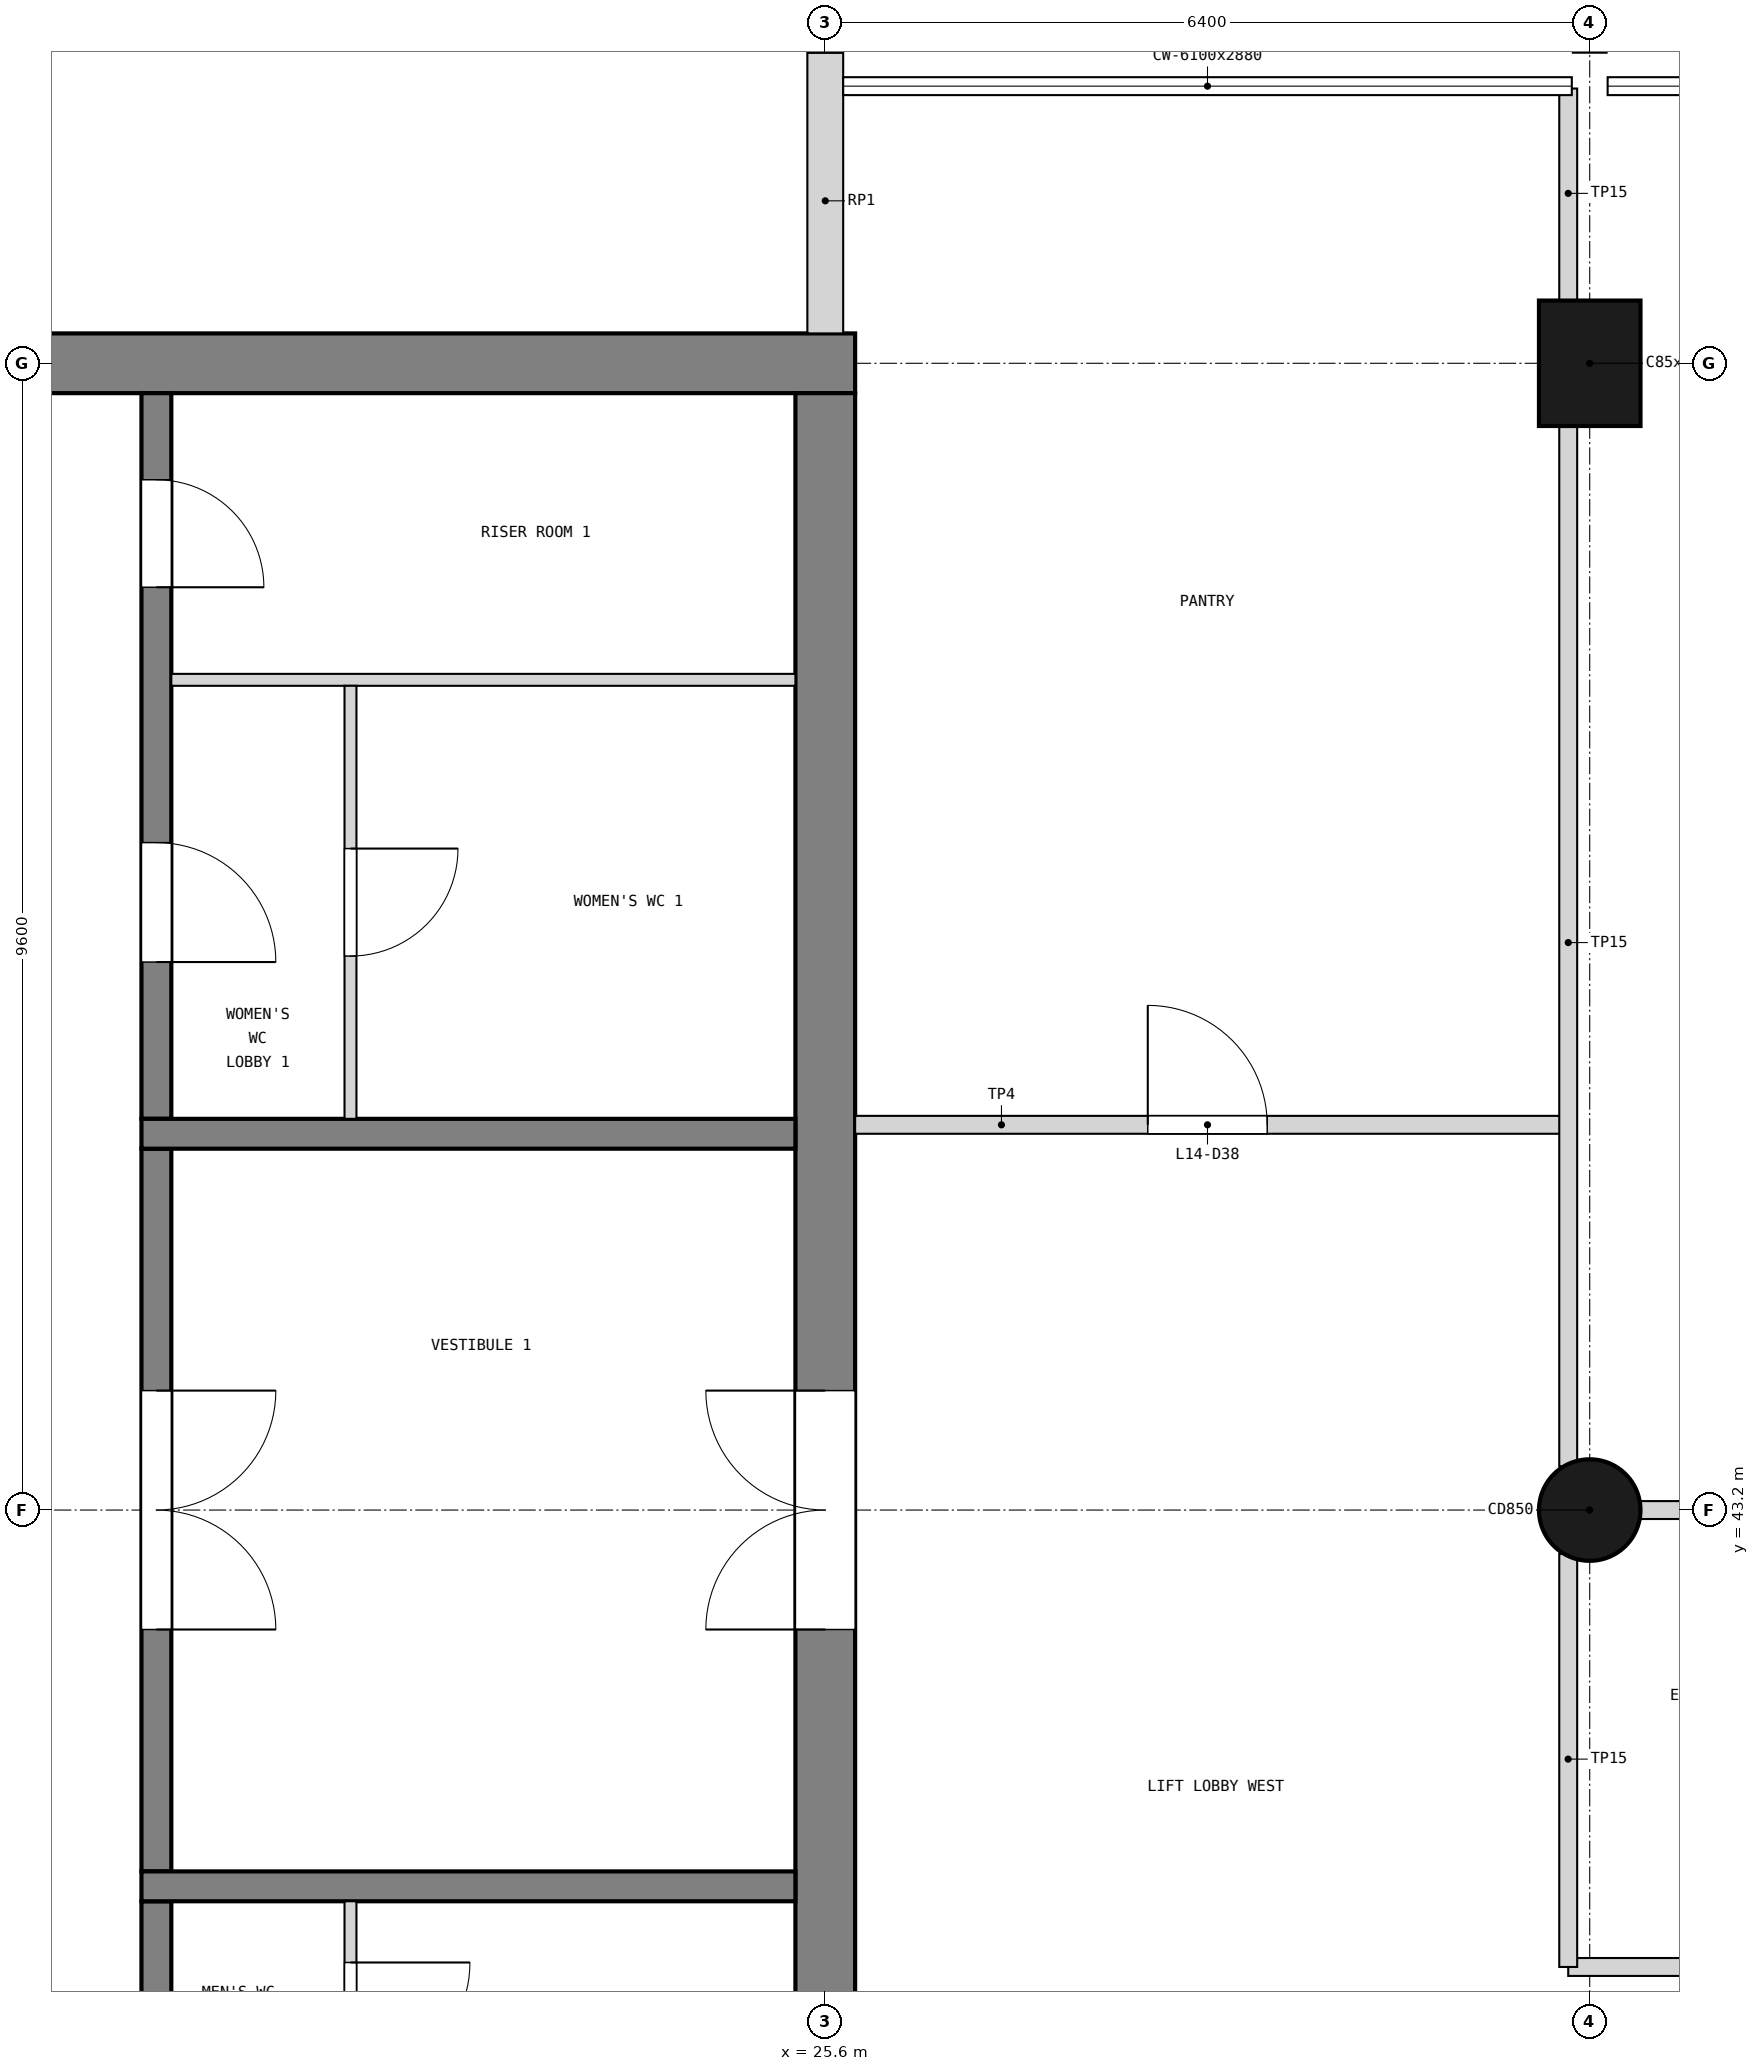
"""IFC4 building model, lengths in metres.
Left out: names, types, materials, properties, quantities, classifications, styles, units other than length and angle.
Written with IfcOpenShell. Run it as: python <this file> out.ifc"""

import sys

from ifc_helpers import new_model, si_unit, direction, frame, frame_2d, origin, origin_2d, place, context, subcontext, project, spatial, rectangle, circle, extrude, element, fill, save


model = new_model("IFC4")
c1 = context("Model", 3, precision=1e-05, world=origin(), true_north=direction((0.0, 1.0)))
c2 = subcontext(c1, "Body", "Model", "MODEL_VIEW")
j1 = project(units=[si_unit("LENGTHUNIT", "METRE"), si_unit("PLANEANGLEUNIT", "RADIAN")], contexts=[c1])
p1 = place(None, origin())
s1 = spatial("IfcSite", under=j1, at=p1, CompositionType="ELEMENT")
p2 = place(p1, origin())
s2 = spatial("IfcBuilding", under=s1, at=p2, CompositionType="ELEMENT")
p3 = place(p2, frame((0.0, 0.0, 56.1)))
s3 = spatial("IfcBuildingStorey", under=s2, at=p3, CompositionType="ELEMENT", Elevation=56.1)
p4 = place(p3, frame((12.55, 52.8, 0.0), z_axis=(0.0, 0.0, 1.0), x_axis=(1.0, 0.0, 0.0)))
e1 = element("IfcWall", 1, at=p4, inside=s3, PredefinedType="SHEAR", context=c2, shape_type="SweptSolid", body=[
    extrude(rectangle(XDim=13.3, YDim=0.5, at=frame_2d((6.65, 0.0))), origin(), (0.0, 0.0, 1.0), 3.9),
])
p5 = place(p4, frame((1.85, 0.0, 1.0)))
e2 = element("IfcOpeningElement", 2, at=p5, cuts=e1, PredefinedType="OPENING", context=c2, shape_type="SweptSolid", body=[
    extrude(rectangle(XDim=0.4, YDim=2.0, at=frame_2d((0.2, 1.0))), frame((0.0, 0.26, 0.0), z_axis=(0.0, -1.0, 0.0), x_axis=(1.0, 0.0, 0.0)), (0.0, 0.0, 1.0), 0.52),
])
p6 = place(p3, frame((25.6, 33.85, 0.0), z_axis=(0.0, 0.0, 1.0), x_axis=(0.0, 1.0, 0.0)))
e3 = element("IfcWall", 3, at=p6, inside=s3, PredefinedType="SHEAR", context=c2, shape_type="SweptSolid", body=[
    extrude(rectangle(XDim=18.7, YDim=0.5, at=frame_2d((9.35, 0.0))), origin(), (0.0, 0.0, 1.0), 3.9),
])
p7 = place(p6, frame((8.35, 0.0, 0.0)))
e4 = element("IfcOpeningElement", 4, at=p7, cuts=e3, PredefinedType="OPENING", context=c2, shape_type="SweptSolid", body=[
    extrude(rectangle(XDim=2.0, YDim=2.1, at=frame_2d((1.0, 1.05))), frame((0.0, 0.26, 0.0), z_axis=(0.0, -1.0, 0.0), x_axis=(1.0, 0.0, 0.0)), (0.0, 0.0, 1.0), 0.52),
])
p8 = place(p3, frame((32.0, 43.2, 0.0), z_axis=(0.0, 0.0, 1.0), x_axis=(1.0, 0.0, 0.0)))
e5 = element("IfcColumn", 5, at=p8, inside=s3, PredefinedType="COLUMN", context=c2, shape_type="SweptSolid", body=[
    extrude(circle(Radius=0.425, at=origin_2d()), origin(), (0.0, 0.0, 1.0), 3.9),
])
p9 = place(p3, frame((32.0, 52.8, 0.0), z_axis=(0.0, 0.0, 1.0), x_axis=(1.0, 0.0, 0.0)))
e6 = element("IfcColumn", 6, at=p9, inside=s3, PredefinedType="COLUMN", context=c2, shape_type="SweptSolid", body=[
    extrude(rectangle(XDim=0.85, YDim=1.05, at=origin_2d()), origin(), (0.0, 0.0, 1.0), 3.9),
])
p10 = place(p3, frame((25.6, 53.05, 0.0), z_axis=(0.0, 0.0, 1.0), x_axis=(0.0, 1.0, 0.0)))
e7 = element("IfcWall", 7, at=p10, inside=s3, PredefinedType="SOLIDWALL", context=c2, shape_type="SweptSolid", body=[
    extrude(rectangle(XDim=2.35, YDim=0.3, at=frame_2d((1.175, 0.0))), origin(), (0.0, 0.0, 1.0), 2.88),
])
p11 = place(p3, frame((20.0, 33.85, 0.0), z_axis=(0.0, 0.0, 1.0), x_axis=(0.0, 1.0, 0.0)))
e8 = element("IfcWall", 8, at=p11, inside=s3, PredefinedType="SOLIDWALL", context=c2, shape_type="SweptSolid", body=[
    extrude(rectangle(XDim=6.075, YDim=0.25, at=frame_2d((3.038, 0.0))), origin(), (0.0, 0.0, 1.0), 3.6),
])
p12 = place(p11, frame((0.425, 0.0, 0.0)))
e9 = element("IfcOpeningElement", 9, at=p12, cuts=e8, PredefinedType="OPENING", context=c2, shape_type="SweptSolid", body=[
    extrude(rectangle(XDim=0.8, YDim=2.1, at=frame_2d((0.4, 1.05))), frame((0.0, 0.135, 0.0), z_axis=(0.0, -1.0, 0.0), x_axis=(1.0, 0.0, 0.0)), (0.0, 0.0, 1.0), 0.27),
])
p13 = place(p11, frame((3.413, 0.0, 0.0)))
e10 = element("IfcOpeningElement", 10, at=p13, cuts=e8, PredefinedType="OPENING", context=c2, shape_type="SweptSolid", body=[
    extrude(rectangle(XDim=1.0, YDim=2.1, at=frame_2d((0.5, 1.05))), frame((0.0, 0.135, 0.0), z_axis=(0.0, -1.0, 0.0), x_axis=(1.0, 0.0, 0.0)), (0.0, 0.0, 1.0), 0.27),
])
p14 = place(p3, frame((20.0, 40.175, 0.0), z_axis=(0.0, 0.0, 1.0), x_axis=(0.0, 1.0, 0.0)))
e11 = element("IfcWall", 11, at=p14, inside=s3, PredefinedType="SOLIDWALL", context=c2, shape_type="SweptSolid", body=[
    extrude(rectangle(XDim=6.05, YDim=0.25, at=frame_2d((3.025, 0.0))), origin(), (0.0, 0.0, 1.0), 3.6),
])
p15 = place(p14, frame((2.025, 0.0, 0.0)))
e12 = element("IfcOpeningElement", 12, at=p15, cuts=e11, PredefinedType="OPENING", context=c2, shape_type="SweptSolid", body=[
    extrude(rectangle(XDim=2.0, YDim=2.1, at=frame_2d((1.0, 1.05))), frame((0.0, 0.135, 0.0), z_axis=(0.0, -1.0, 0.0), x_axis=(1.0, 0.0, 0.0)), (0.0, 0.0, 1.0), 0.27),
])
p16 = place(p3, frame((20.0, 46.475, 0.0), z_axis=(0.0, 0.0, 1.0), x_axis=(0.0, 1.0, 0.0)))
e13 = element("IfcWall", 13, at=p16, inside=s3, PredefinedType="SOLIDWALL", context=c2, shape_type="SweptSolid", body=[
    extrude(rectangle(XDim=6.075, YDim=0.25, at=frame_2d((3.038, 0.0))), origin(), (0.0, 0.0, 1.0), 3.6),
])
p17 = place(p16, frame((1.312, 0.0, 0.0)))
e14 = element("IfcOpeningElement", 14, at=p17, cuts=e13, PredefinedType="OPENING", context=c2, shape_type="SweptSolid", body=[
    extrude(rectangle(XDim=1.0, YDim=2.1, at=frame_2d((0.5, 1.05))), frame((0.0, 0.135, 0.0), z_axis=(0.0, -1.0, 0.0), x_axis=(1.0, 0.0, 0.0)), (0.0, 0.0, 1.0), 0.27),
])
p18 = place(p16, frame((4.45, 0.0, 0.0)))
e15 = element("IfcOpeningElement", 15, at=p18, cuts=e13, PredefinedType="OPENING", context=c2, shape_type="SweptSolid", body=[
    extrude(rectangle(XDim=0.9, YDim=2.1, at=frame_2d((0.45, 1.05))), frame((0.0, 0.135, 0.0), z_axis=(0.0, -1.0, 0.0), x_axis=(1.0, 0.0, 0.0)), (0.0, 0.0, 1.0), 0.27),
])
for number, where, z_axis, x_axis in (
    (16, (19.875, 40.05, 0.0), (0.0, 0.0, 1.0), (1.0, 0.0, 0.0)),
    (17, (19.875, 46.35, 0.0), (0.0, 0.0, 1.0), (1.0, 0.0, 0.0)),
):
    element("IfcWall", number, at=place(p3, frame(where, z_axis=z_axis, x_axis=x_axis)), inside=s3, PredefinedType="SOLIDWALL", context=c2, shape_type="SweptSolid", body=[
        extrude(rectangle(XDim=5.475, YDim=0.25, at=frame_2d((2.738, 0.0))), origin(), (0.0, 0.0, 1.0), 3.6),
    ])
p19 = place(p3, frame((21.625, 35.6, 0.0), z_axis=(0.0, 0.0, 1.0), x_axis=(0.0, 1.0, 0.0)))
e18 = element("IfcWall", 18, at=p19, inside=s3, PredefinedType="PARTITIONING", context=c2, shape_type="SweptSolid", body=[
    extrude(rectangle(XDim=4.325, YDim=0.1, at=frame_2d((2.163, 0.0))), origin(), (0.0, 0.0, 1.0), 3.6),
])
p20 = place(p19, frame((0.45, 0.0, 0.0)))
e19 = element("IfcOpeningElement", 19, at=p20, cuts=e18, PredefinedType="OPENING", context=c2, shape_type="SweptSolid", body=[
    extrude(rectangle(XDim=0.9, YDim=2.1, at=frame_2d((0.45, 1.05))), frame((0.0, 0.06, 0.0), z_axis=(0.0, -1.0, 0.0), x_axis=(1.0, 0.0, 0.0)), (0.0, 0.0, 1.0), 0.12),
])
p21 = place(p19, frame((2.812, 0.0, 0.0)))
e20 = element("IfcOpeningElement", 20, at=p21, cuts=e18, PredefinedType="OPENING", context=c2, shape_type="SweptSolid", body=[
    extrude(rectangle(XDim=1.0, YDim=2.1, at=frame_2d((0.5, 1.05))), frame((0.0, 0.06, 0.0), z_axis=(0.0, -1.0, 0.0), x_axis=(1.0, 0.0, 0.0)), (0.0, 0.0, 1.0), 0.12),
])
p22 = place(p3, frame((20.125, 50.15, 0.0), z_axis=(0.0, 0.0, 1.0), x_axis=(1.0, 0.0, 0.0)))
e21 = element("IfcWall", 21, at=p22, inside=s3, PredefinedType="PARTITIONING", context=c2, shape_type="SweptSolid", body=[
    extrude(rectangle(XDim=5.225, YDim=0.1, at=frame_2d((2.613, 0.0))), origin(), (0.0, 0.0, 1.0), 3.6),
])
p23 = place(p3, frame((21.625, 46.475, 0.0), z_axis=(0.0, 0.0, 1.0), x_axis=(0.0, 1.0, 0.0)))
e22 = element("IfcWall", 22, at=p23, inside=s3, PredefinedType="PARTITIONING", context=c2, shape_type="SweptSolid", body=[
    extrude(rectangle(XDim=3.625, YDim=0.1, at=frame_2d((1.812, 0.0))), origin(), (0.0, 0.0, 1.0), 3.6),
])
p24 = place(p23, frame((1.363, 0.0, 0.0)))
e23 = element("IfcOpeningElement", 23, at=p24, cuts=e22, PredefinedType="OPENING", context=c2, shape_type="SweptSolid", body=[
    extrude(rectangle(XDim=0.9, YDim=2.1, at=frame_2d((0.45, 1.05))), frame((0.0, 0.06, 0.0), z_axis=(0.0, -1.0, 0.0), x_axis=(1.0, 0.0, 0.0)), (0.0, 0.0, 1.0), 0.12),
])
p25 = place(p3, frame((31.82, 39.375, 0.0), z_axis=(0.0, 0.0, 1.0), x_axis=(1.0, 0.0, 0.0)))
e24 = element("IfcWall", 24, at=p25, inside=s3, PredefinedType="PARTITIONING", context=c2, shape_type="SweptSolid", body=[
    extrude(rectangle(XDim=6.4, YDim=0.15, at=frame_2d((3.2, 0.0))), origin(), (0.0, 0.0, 1.0), 3.68),
])
p26 = place(p25, frame((2.28, 0.0, 0.0)))
e25 = element("IfcOpeningElement", 25, at=p26, cuts=e24, PredefinedType="OPENING", context=c2, shape_type="SweptSolid", body=[
    extrude(rectangle(XDim=1.8, YDim=2.1, at=frame_2d((0.9, 1.05))), frame((0.0, 0.085, 0.0), z_axis=(0.0, -1.0, 0.0), x_axis=(1.0, 0.0, 0.0)), (0.0, 0.0, 1.0), 0.17),
])
p27 = place(p3, frame((31.82, 43.2, 0.0), z_axis=(0.0, 0.0, 1.0), x_axis=(1.0, 0.0, 0.0)))
e26 = element("IfcWall", 26, at=p27, inside=s3, PredefinedType="PARTITIONING", context=c2, shape_type="SweptSolid", body=[
    extrude(rectangle(XDim=25.96, YDim=0.15, at=frame_2d((12.98, 0.0))), origin(), (0.0, 0.0, 1.0), 2.88),
])
p28 = place(p27, frame((7.975, 0.0, 0.0)))
e27 = element("IfcOpeningElement", 27, at=p28, cuts=e26, PredefinedType="OPENING", context=c2, shape_type="SweptSolid", body=[
    extrude(rectangle(XDim=1.8, YDim=2.1, at=frame_2d((0.9, 1.05))), frame((0.0, 0.085, 0.0), z_axis=(0.0, -1.0, 0.0), x_axis=(1.0, 0.0, 0.0)), (0.0, 0.0, 1.0), 0.17),
])
p29 = place(p27, frame((13.725, 0.0, 0.0)))
e28 = element("IfcOpeningElement", 28, at=p29, cuts=e26, PredefinedType="OPENING", context=c2, shape_type="SweptSolid", body=[
    extrude(rectangle(XDim=1.8, YDim=2.1, at=frame_2d((0.9, 1.05))), frame((0.0, 0.085, 0.0), z_axis=(0.0, -1.0, 0.0), x_axis=(1.0, 0.0, 0.0)), (0.0, 0.0, 1.0), 0.17),
])
p30 = place(p27, frame((20.192, 0.0, 0.0)))
e29 = element("IfcOpeningElement", 29, at=p30, cuts=e26, PredefinedType="OPENING", context=c2, shape_type="SweptSolid", body=[
    extrude(rectangle(XDim=1.8, YDim=2.1, at=frame_2d((0.9, 1.05))), frame((0.0, 0.085, 0.0), z_axis=(0.0, -1.0, 0.0), x_axis=(1.0, 0.0, 0.0)), (0.0, 0.0, 1.0), 0.17),
])
p31 = place(p3, frame((25.85, 46.425, 0.0), z_axis=(0.0, 0.0, 1.0), x_axis=(1.0, 0.0, 0.0)))
e30 = element("IfcWall", 30, at=p31, inside=s3, PredefinedType="PARTITIONING", context=c2, shape_type="SweptSolid", body=[
    extrude(rectangle(XDim=5.97, YDim=0.15, at=frame_2d((2.985, 0.0))), origin(), (0.0, 0.0, 1.0), 3.68),
])
p32 = place(p31, frame((2.45, 0.0, 0.0)))
e31 = element("IfcOpeningElement", 31, at=p32, cuts=e30, PredefinedType="OPENING", context=c2, shape_type="SweptSolid", body=[
    extrude(rectangle(XDim=1.0, YDim=2.1, at=frame_2d((0.5, 1.05))), frame((0.0, 0.085, 0.0), z_axis=(0.0, -1.0, 0.0), x_axis=(1.0, 0.0, 0.0)), (0.0, 0.0, 1.0), 0.17),
])
p33 = place(p3, frame((31.82, 39.375, 0.0), z_axis=(0.0, 0.0, 1.0), x_axis=(0.0, 1.0, 0.0)))
e32 = element("IfcWall", 32, at=p33, inside=s3, PredefinedType="PARTITIONING", context=c2, shape_type="SweptSolid", body=[
    extrude(rectangle(XDim=3.46, YDim=0.15, at=frame_2d((1.73, 0.0))), origin(), (0.0, 0.0, 1.0), 2.78),
])
p34 = place(p3, frame((31.82, 43.565, 0.0), z_axis=(0.0, 0.0, 1.0), x_axis=(0.0, 1.0, 0.0)))
e33 = element("IfcWall", 33, at=p34, inside=s3, PredefinedType="PARTITIONING", context=c2, shape_type="SweptSolid", body=[
    extrude(rectangle(XDim=8.73, YDim=0.15, at=frame_2d((4.365, 0.0))), origin(), (0.0, 0.0, 1.0), 2.78),
])
p35 = place(p3, frame((31.82, 53.305, 0.0), z_axis=(0.0, 0.0, 1.0), x_axis=(0.0, 1.0, 0.0)))
e34 = element("IfcWall", 34, at=p35, inside=s3, PredefinedType="PARTITIONING", context=c2, shape_type="SweptSolid", body=[
    extrude(rectangle(XDim=1.795, YDim=0.15, at=frame_2d((0.897, 0.0))), origin(), (0.0, 0.0, 1.0), 2.78),
])
p36 = place(p15, frame((2.0, 0.0, 0.0), z_axis=(0.0, 0.0, 1.0), x_axis=(-1.0, 0.0, 0.0)))
e35 = element("IfcDoor", 35, at=p36, inside=s3, OperationType="DOUBLE_DOOR_SINGLE_SWING", PredefinedType="DOOR", context=c2, shape_type="SweptSolid", body=[
    extrude(rectangle(XDim=2.0, YDim=2.1, at=frame_2d((1.0, 1.05))), frame((0.0, 0.025, 0.0), z_axis=(0.0, -1.0, 0.0), x_axis=(1.0, 0.0, 0.0)), (0.0, 0.0, 1.0), 0.05),
])
fill(e12, e35)
p37 = place(p7, origin())
e36 = element("IfcDoor", 36, at=p37, inside=s3, OperationType="DOUBLE_DOOR_SINGLE_SWING", PredefinedType="DOOR", context=c2, shape_type="SweptSolid", body=[
    extrude(rectangle(XDim=2.0, YDim=2.1, at=frame_2d((1.0, 1.05))), frame((0.0, 0.025, 0.0), z_axis=(0.0, -1.0, 0.0), x_axis=(1.0, 0.0, 0.0)), (0.0, 0.0, 1.0), 0.05),
])
fill(e4, e36)
p38 = place(p21, frame((1.0, 0.0, 0.0), z_axis=(0.0, 0.0, 1.0), x_axis=(-1.0, 0.0, 0.0)))
e37 = element("IfcDoor", 37, at=p38, inside=s3, OperationType="SINGLE_SWING_LEFT", PredefinedType="DOOR", context=c2, shape_type="SweptSolid", body=[
    extrude(rectangle(XDim=1.0, YDim=2.1, at=frame_2d((0.5, 1.05))), frame((0.0, 0.025, 0.0), z_axis=(0.0, -1.0, 0.0), x_axis=(1.0, 0.0, 0.0)), (0.0, 0.0, 1.0), 0.05),
])
fill(e20, e37)
p39 = place(p17, frame((1.0, 0.0, 0.0), z_axis=(0.0, 0.0, 1.0), x_axis=(-1.0, 0.0, 0.0)))
e38 = element("IfcDoor", 38, at=p39, inside=s3, OperationType="SINGLE_SWING_RIGHT", PredefinedType="DOOR", context=c2, shape_type="SweptSolid", body=[
    extrude(rectangle(XDim=1.0, YDim=2.1, at=frame_2d((0.5, 1.05))), frame((0.0, 0.025, 0.0), z_axis=(0.0, -1.0, 0.0), x_axis=(1.0, 0.0, 0.0)), (0.0, 0.0, 1.0), 0.05),
])
fill(e14, e38)
p40 = place(p24, frame((0.9, 0.0, 0.0), z_axis=(0.0, 0.0, 1.0), x_axis=(-1.0, 0.0, 0.0)))
e39 = element("IfcDoor", 39, at=p40, inside=s3, OperationType="SINGLE_SWING_LEFT", PredefinedType="DOOR", context=c2, shape_type="SweptSolid", body=[
    extrude(rectangle(XDim=0.9, YDim=2.1, at=frame_2d((0.45, 1.05))), frame((0.0, 0.025, 0.0), z_axis=(0.0, -1.0, 0.0), x_axis=(1.0, 0.0, 0.0)), (0.0, 0.0, 1.0), 0.05),
])
fill(e23, e39)
p41 = place(p18, frame((0.9, 0.0, 0.0), z_axis=(0.0, 0.0, 1.0), x_axis=(-1.0, 0.0, 0.0)))
e40 = element("IfcDoor", 40, at=p41, inside=s3, OperationType="SINGLE_SWING_RIGHT", PredefinedType="DOOR", context=c2, shape_type="SweptSolid", body=[
    extrude(rectangle(XDim=0.9, YDim=2.1, at=frame_2d((0.45, 1.05))), frame((0.0, 0.025, 0.0), z_axis=(0.0, -1.0, 0.0), x_axis=(1.0, 0.0, 0.0)), (0.0, 0.0, 1.0), 0.05),
])
fill(e15, e40)
p42 = place(p32, origin())
e41 = element("IfcDoor", 41, at=p42, inside=s3, OperationType="SINGLE_SWING_LEFT", PredefinedType="DOOR", context=c2, shape_type="SweptSolid", body=[
    extrude(rectangle(XDim=1.0, YDim=2.1, at=frame_2d((0.5, 1.05))), frame((0.0, 0.025, 0.0), z_axis=(0.0, -1.0, 0.0), x_axis=(1.0, 0.0, 0.0)), (0.0, 0.0, 1.0), 0.05),
])
fill(e31, e41)
save(model, sys.argv[1])
